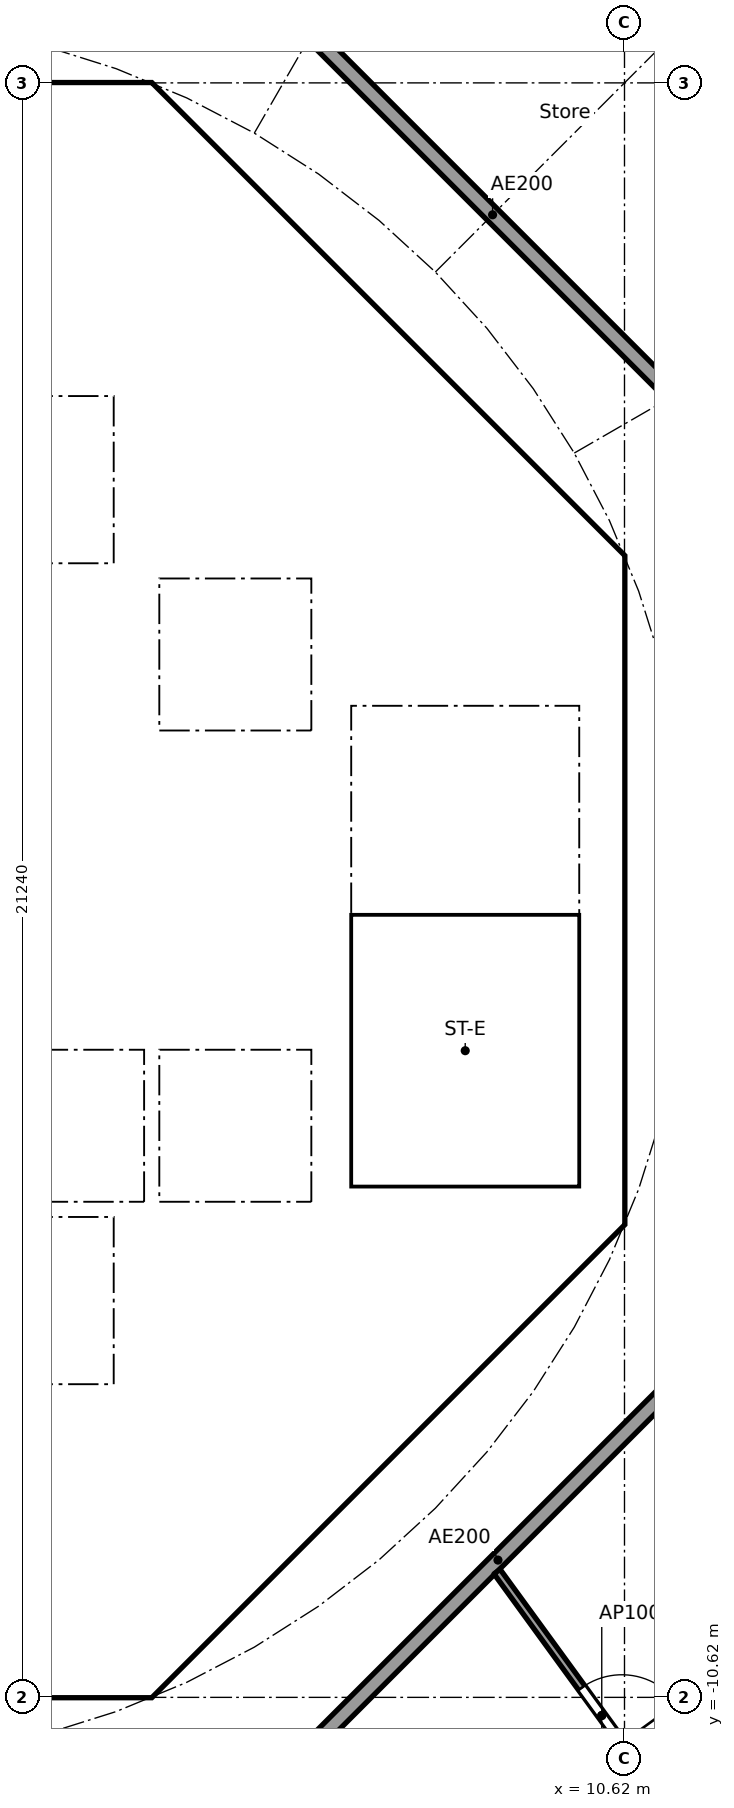
"""IFC4 building model, lengths in metres.
Left out: names, types, materials, properties, quantities, classifications, styles, units other than length and angle.
Written with IfcOpenShell. Run it as: python <this file> out.ifc"""

import sys

from ifc_helpers import new_model, si_unit, direction, frame, frame_2d, origin, place, context, subcontext, project, spatial, polyline, rectangle, outline, extrude, element, fill, save


model = new_model("IFC4")
c1 = context("Model", 3, precision=1e-05, world=origin(), true_north=direction((0.0, 1.0)))
c2 = subcontext(c1, "Body", "Model", "MODEL_VIEW")
j1 = project(units=[si_unit("LENGTHUNIT", "METRE"), si_unit("PLANEANGLEUNIT", "RADIAN")], contexts=[c1])
p1 = place(None, origin())
s1 = spatial("IfcSite", under=j1, at=p1, CompositionType="ELEMENT")
p2 = place(p1, origin())
s2 = spatial("IfcBuilding", under=s1, at=p2, CompositionType="ELEMENT")
p3 = place(p2, frame((0.0, 0.0, 269.6)))
s3 = spatial("IfcBuildingStorey", under=s2, at=p3, CompositionType="ELEMENT", Elevation=269.6)
p4 = place(p3, frame((9.988, 4.613, 0.0), z_axis=(0.0, 0.0, 1.0), x_axis=(-0.707106781187, 0.707106781187, 0.0)))
e1 = element("IfcWall", 1, at=p4, inside=s3, PredefinedType="SHEAR", context=c2, shape_type="SweptSolid", body=[
    extrude(rectangle(XDim=7.602, YDim=0.6, at=frame_2d((3.801, 0.0))), origin(), (0.0, 0.0, 1.0), 3.44),
])
p5 = place(p4, frame((3.201, 0.0, 0.0)))
e2 = element("IfcOpeningElement", 2, at=p5, cuts=e1, PredefinedType="OPENING", context=c2, shape_type="SweptSolid", body=[
    extrude(rectangle(XDim=1.2, YDim=2.1, at=frame_2d((0.6, 1.05))), frame((0.0, 0.31, 0.0), z_axis=(0.0, -1.0, 0.0), x_axis=(1.0, 0.0, 0.0)), (0.0, 0.0, 1.0), 0.62),
])
p6 = place(p3, frame((4.613, -9.988, 0.0), z_axis=(0.0, 0.0, 1.0), x_axis=(0.707106781187, 0.707106781187, 0.0)))
e3 = element("IfcWall", 3, at=p6, inside=s3, PredefinedType="SHEAR", context=c2, shape_type="SweptSolid", body=[
    extrude(rectangle(XDim=7.602, YDim=0.6, at=frame_2d((3.801, 0.0))), origin(), (0.0, 0.0, 1.0), 3.44),
])
p7 = place(p6, frame((3.201, 0.0, 0.0)))
e4 = element("IfcOpeningElement", 4, at=p7, cuts=e3, PredefinedType="OPENING", context=c2, shape_type="SweptSolid", body=[
    extrude(rectangle(XDim=1.2, YDim=2.1, at=frame_2d((0.6, 1.05))), frame((0.0, 0.31, 0.0), z_axis=(0.0, -1.0, 0.0), x_axis=(1.0, 0.0, 0.0)), (0.0, 0.0, 1.0), 0.62),
])
p8 = place(p3, frame((4.0, 4.3, 0.0), z_axis=(0.0, 0.0, 1.0), x_axis=(0.0, 1.0, 0.0)))
e5 = element("IfcWall", 5, at=p8, inside=s3, PredefinedType="SOLIDWALL", context=c2, shape_type="SweptSolid", body=[
    extrude(rectangle(XDim=2.2, YDim=0.2, at=frame_2d((1.1, 0.0))), origin(), (0.0, 0.0, 1.0), 3.44),
])
p9 = place(p8, frame((0.55, 0.0, 0.0)))
e6 = element("IfcOpeningElement", 6, at=p9, cuts=e5, PredefinedType="OPENING", context=c2, shape_type="SweptSolid", body=[
    extrude(rectangle(XDim=1.1, YDim=2.1, at=frame_2d((0.55, 1.05))), frame((0.0, 0.11, 0.0), z_axis=(0.0, -1.0, 0.0), x_axis=(1.0, 0.0, 0.0)), (0.0, 0.0, 1.0), 0.22),
])
p10 = place(p3, frame((-6.7, 2.0, 0.0), z_axis=(0.0, 0.0, 1.0), x_axis=(1.0, 0.0, 0.0)))
e7 = element("IfcWall", 7, at=p10, inside=s3, PredefinedType="SOLIDWALL", context=c2, shape_type="SweptSolid", body=[
    extrude(rectangle(XDim=13.4, YDim=0.2, at=frame_2d((6.7, 0.0))), origin(), (0.0, 0.0, 1.0), 3.44),
])
p11 = place(p10, frame((11.65, 0.0, 0.0)))
e8 = element("IfcOpeningElement", 8, at=p11, cuts=e7, PredefinedType="OPENING", context=c2, shape_type="SweptSolid", body=[
    extrude(rectangle(XDim=1.1, YDim=2.1, at=frame_2d((0.55, 1.05))), frame((0.0, 0.11, 0.0), z_axis=(0.0, -1.0, 0.0), x_axis=(1.0, 0.0, 0.0)), (0.0, 0.0, 1.0), 0.22),
])
p12 = place(p10, frame((0.75, 0.0, 0.0)))
e9 = element("IfcOpeningElement", 9, at=p12, cuts=e7, PredefinedType="OPENING", context=c2, shape_type="SweptSolid", body=[
    extrude(rectangle(XDim=0.9, YDim=2.1, at=frame_2d((0.45, 1.05))), frame((0.0, 0.11, 0.0), z_axis=(0.0, -1.0, 0.0), x_axis=(1.0, 0.0, 0.0)), (0.0, 0.0, 1.0), 0.22),
])
p13 = place(p10, frame((4.05, 0.0, 0.0)))
e10 = element("IfcOpeningElement", 10, at=p13, cuts=e7, PredefinedType="OPENING", context=c2, shape_type="SweptSolid", body=[
    extrude(rectangle(XDim=0.9, YDim=2.1, at=frame_2d((0.45, 1.05))), frame((0.0, 0.11, 0.0), z_axis=(0.0, -1.0, 0.0), x_axis=(1.0, 0.0, 0.0)), (0.0, 0.0, 1.0), 0.22),
])
p14 = place(p10, frame((7.35, 0.0, 0.0)))
e11 = element("IfcOpeningElement", 11, at=p14, cuts=e7, PredefinedType="OPENING", context=c2, shape_type="SweptSolid", body=[
    extrude(rectangle(XDim=0.9, YDim=2.1, at=frame_2d((0.45, 1.05))), frame((0.0, 0.11, 0.0), z_axis=(0.0, -1.0, 0.0), x_axis=(1.0, 0.0, 0.0)), (0.0, 0.0, 1.0), 0.22),
])
p15 = place(p10, frame((9.55, 0.0, 0.0)))
e12 = element("IfcOpeningElement", 12, at=p15, cuts=e7, PredefinedType="OPENING", context=c2, shape_type="SweptSolid", body=[
    extrude(rectangle(XDim=0.9, YDim=2.1, at=frame_2d((0.45, 1.05))), frame((0.0, 0.11, 0.0), z_axis=(0.0, -1.0, 0.0), x_axis=(1.0, 0.0, 0.0)), (0.0, 0.0, 1.0), 0.22),
])
p16 = place(p3, frame((6.7, 4.0, 0.0), z_axis=(0.0, 0.0, 1.0), x_axis=(1.0, 0.0, 0.0)))
e13 = element("IfcWall", 13, at=p16, inside=s3, PredefinedType="SOLIDWALL", context=c2, shape_type="SweptSolid", body=[
    extrude(rectangle(XDim=3.325, YDim=0.2, at=frame_2d((1.662, 0.0))), origin(), (0.0, 0.0, 1.0), 3.44),
])
p17 = place(p16, frame((1.25, 0.0, 0.0)))
e14 = element("IfcOpeningElement", 14, at=p17, cuts=e13, PredefinedType="OPENING", context=c2, shape_type="SweptSolid", body=[
    extrude(rectangle(XDim=1.1, YDim=2.1, at=frame_2d((0.55, 1.05))), frame((0.0, 0.11, 0.0), z_axis=(0.0, -1.0, 0.0), x_axis=(1.0, 0.0, 0.0)), (0.0, 0.0, 1.0), 0.22),
])
p18 = place(p3, frame((4.0, 7.025, 0.0), z_axis=(0.0, 0.0, 1.0), x_axis=(0.0, 1.0, 0.0)))
e15 = element("IfcWall", 15, at=p18, inside=s3, PredefinedType="SOLIDWALL", context=c2, shape_type="SweptSolid", body=[
    extrude(rectangle(XDim=3.0, YDim=0.2, at=frame_2d((1.5, 0.0))), origin(), (0.0, 0.0, 1.0), 3.44),
])
p19 = place(p18, frame((0.925, 0.0, 0.0)))
e16 = element("IfcOpeningElement", 16, at=p19, cuts=e15, PredefinedType="OPENING", context=c2, shape_type="SweptSolid", body=[
    extrude(rectangle(XDim=1.1, YDim=2.1, at=frame_2d((0.55, 1.05))), frame((0.0, 0.11, 0.0), z_axis=(0.0, -1.0, 0.0), x_axis=(1.0, 0.0, 0.0)), (0.0, 0.0, 1.0), 0.22),
])
p20 = place(p3, frame((4.0, -10.025, 0.0), z_axis=(0.0, 0.0, 1.0), x_axis=(0.0, 1.0, 0.0)))
e17 = element("IfcWall", 17, at=p20, inside=s3, PredefinedType="SOLIDWALL", context=c2, shape_type="SweptSolid", body=[
    extrude(rectangle(XDim=3.0, YDim=0.2, at=frame_2d((1.5, 0.0))), origin(), (0.0, 0.0, 1.0), 3.44),
])
p21 = place(p20, frame((0.975, 0.0, 0.0)))
e18 = element("IfcOpeningElement", 18, at=p21, cuts=e17, PredefinedType="OPENING", context=c2, shape_type="SweptSolid", body=[
    extrude(rectangle(XDim=1.1, YDim=2.1, at=frame_2d((0.55, 1.05))), frame((0.0, 0.11, 0.0), z_axis=(0.0, -1.0, 0.0), x_axis=(1.0, 0.0, 0.0)), (0.0, 0.0, 1.0), 0.22),
])
p22 = place(p3, frame((4.0, -6.5, 0.0), z_axis=(0.0, 0.0, 1.0), x_axis=(0.0, 1.0, 0.0)))
e19 = element("IfcWall", 19, at=p22, inside=s3, PredefinedType="SOLIDWALL", context=c2, shape_type="SweptSolid", body=[
    extrude(rectangle(XDim=2.2, YDim=0.2, at=frame_2d((1.1, 0.0))), origin(), (0.0, 0.0, 1.0), 3.44),
])
p23 = place(p22, frame((0.55, 0.0, 0.0)))
e20 = element("IfcOpeningElement", 20, at=p23, cuts=e19, PredefinedType="OPENING", context=c2, shape_type="SweptSolid", body=[
    extrude(rectangle(XDim=1.1, YDim=2.1, at=frame_2d((0.55, 1.05))), frame((0.0, 0.11, 0.0), z_axis=(0.0, -1.0, 0.0), x_axis=(1.0, 0.0, 0.0)), (0.0, 0.0, 1.0), 0.22),
])
p24 = place(p3, frame((-6.7, -2.0, 0.0), z_axis=(0.0, 0.0, 1.0), x_axis=(1.0, 0.0, 0.0)))
e21 = element("IfcWall", 21, at=p24, inside=s3, PredefinedType="SOLIDWALL", context=c2, shape_type="SweptSolid", body=[
    extrude(rectangle(XDim=13.4, YDim=0.2, at=frame_2d((6.7, 0.0))), origin(), (0.0, 0.0, 1.0), 3.44),
])
p25 = place(p24, frame((9.45, 0.0, 0.0)))
e22 = element("IfcOpeningElement", 22, at=p25, cuts=e21, PredefinedType="OPENING", context=c2, shape_type="SweptSolid", body=[
    extrude(rectangle(XDim=1.1, YDim=2.1, at=frame_2d((0.55, 1.05))), frame((0.0, 0.11, 0.0), z_axis=(0.0, -1.0, 0.0), x_axis=(1.0, 0.0, 0.0)), (0.0, 0.0, 1.0), 0.22),
])
p26 = place(p24, frame((11.65, 0.0, 0.0)))
e23 = element("IfcOpeningElement", 23, at=p26, cuts=e21, PredefinedType="OPENING", context=c2, shape_type="SweptSolid", body=[
    extrude(rectangle(XDim=1.1, YDim=2.1, at=frame_2d((0.55, 1.05))), frame((0.0, 0.11, 0.0), z_axis=(0.0, -1.0, 0.0), x_axis=(1.0, 0.0, 0.0)), (0.0, 0.0, 1.0), 0.22),
])
p27 = place(p24, frame((1.85, 0.0, 0.0)))
e24 = element("IfcOpeningElement", 24, at=p27, cuts=e21, PredefinedType="OPENING", context=c2, shape_type="SweptSolid", body=[
    extrude(rectangle(XDim=0.9, YDim=2.1, at=frame_2d((0.45, 1.05))), frame((0.0, 0.11, 0.0), z_axis=(0.0, -1.0, 0.0), x_axis=(1.0, 0.0, 0.0)), (0.0, 0.0, 1.0), 0.22),
])
p28 = place(p24, frame((6.25, 0.0, 0.0)))
e25 = element("IfcOpeningElement", 25, at=p28, cuts=e21, PredefinedType="OPENING", context=c2, shape_type="SweptSolid", body=[
    extrude(rectangle(XDim=0.9, YDim=2.1, at=frame_2d((0.45, 1.05))), frame((0.0, 0.11, 0.0), z_axis=(0.0, -1.0, 0.0), x_axis=(1.0, 0.0, 0.0)), (0.0, 0.0, 1.0), 0.22),
])
p29 = place(p3, origin())
e26 = element("IfcWall", 26, at=p29, inside=s3, PredefinedType="SHEAR", context=c2, shape_type="SweptSolid", body=[
    extrude(outline(polyline([(-4.152, -10.025), (4.152, -10.025), (4.401, -9.776), (4.825, -10.2), (4.401, -10.625), (-4.401, -10.625), (-4.825, -10.2), (-4.401, -9.776), (-4.152, -10.025)])), origin(), (0.0, 0.0, 1.0), 3.44),
])
p30 = place(p3, origin())
e27 = element("IfcWall", 27, at=p30, inside=s3, PredefinedType="SHEAR", context=c2, shape_type="SweptSolid", body=[
    extrude(outline(polyline([(-4.152, 10.025), (-4.401, 9.776), (-4.825, 10.2), (-4.401, 10.625), (4.401, 10.625), (4.825, 10.2), (4.401, 9.776), (4.152, 10.025), (-4.152, 10.025)])), origin(), (0.0, 0.0, 1.0), 3.44),
])
p31 = place(p3, origin())
e28 = element("IfcWall", 28, at=p31, inside=s3, PredefinedType="SHEAR", context=c2, shape_type="SweptSolid", body=[
    extrude(outline(polyline([(9.776, -4.401), (10.025, -4.152), (10.025, -3.801), (10.025, 4.152), (9.776, 4.401), (10.2, 4.825), (10.625, 4.401), (10.625, -4.401), (10.2, -4.825), (9.776, -4.401)])), origin(), (0.0, 0.0, 1.0), 3.44),
])
p32 = place(p3, origin())
e29 = element("IfcWall", 29, at=p32, inside=s3, PredefinedType="SOLIDWALL", context=c2, shape_type="SweptSolid", body=[
    extrude(outline(polyline([(-6.7, 4.3), (6.7, 4.3), (6.7, 2.1), (6.5, 2.1), (6.5, 4.1), (4.5, 4.1), (4.5, 2.1), (4.3, 2.1), (4.3, 4.1), (2.3, 4.1), (2.3, 2.1), (2.1, 2.1), (2.1, 4.1), (0.1, 4.1), (0.1, 2.1), (-0.1, 2.1), (-0.1, 4.1), (-4.3, 4.1), (-4.3, 2.1), (-4.5, 2.1), (-4.5, 4.1), (-6.5, 4.1), (-6.5, 2.1), (-6.7, 2.1), (-6.7, 4.3)])), origin(), (0.0, 0.0, 1.0), 3.44),
])
p33 = place(p3, origin())
e30 = element("IfcWall", 30, at=p33, inside=s3, PredefinedType="SOLIDWALL", context=c2, shape_type="SweptSolid", body=[
    extrude(outline(polyline([(-6.7, -2.1), (-6.5, -2.1), (-6.5, -4.1), (-2.3, -4.1), (-2.3, -2.1), (-2.1, -2.1), (-2.1, -4.1), (2.1, -4.1), (2.1, -2.1), (2.3, -2.1), (2.3, -4.1), (4.3, -4.1), (4.3, -2.1), (4.5, -2.1), (4.5, -4.1), (6.5, -4.1), (6.5, -2.1), (6.7, -2.1), (6.7, -4.3), (-6.7, -4.3), (-6.7, -2.1)])), origin(), (0.0, 0.0, 1.0), 3.44),
])
p34 = place(p3, origin())
e31 = element("IfcWall", 31, at=p34, inside=s3, PredefinedType="SOLIDWALL", context=c2, shape_type="SweptSolid", body=[
    extrude(outline(polyline([(4.1, -7.025), (-4.1, -7.025), (-4.1, -6.5), (4.1, -6.5), (4.1, -7.025)])), origin(), (0.0, 0.0, 1.0), 3.44),
])
p35 = place(p3, origin())
e32 = element("IfcWall", 32, at=p35, inside=s3, PredefinedType="SOLIDWALL", context=c2, shape_type="SweptSolid", body=[
    extrude(outline(polyline([(4.1, 6.5), (-4.1, 6.5), (-4.1, 7.025), (4.1, 7.025), (4.1, 6.5)])), origin(), (0.0, 0.0, 1.0), 3.44),
])
p36 = place(p3, origin())
e33 = element("IfcWall", 33, at=p36, inside=s3, PredefinedType="SOLIDWALL", context=c2, shape_type="SweptSolid", body=[
    extrude(outline(polyline([(7.025, -3.9), (6.7, -3.9), (6.7, 3.9), (7.025, 3.9), (7.025, -3.9)])), origin(), (0.0, 0.0, 1.0), 3.44),
])
p37 = place(p3, origin())
e34 = element("IfcWall", 34, at=p37, inside=s3, PredefinedType="SOLIDWALL", context=c2, shape_type="SweptSolid", body=[
    extrude(outline(polyline([(10.025, -4.1), (6.7, -4.1), (6.7, -3.9), (10.025, -3.9), (10.025, -4.1)])), origin(), (0.0, 0.0, 1.0), 3.44),
])
p38 = place(p3, frame((12.635, 5.134, 0.0), z_axis=(0.0, 0.0, 1.0), x_axis=(-0.707106781187, 0.707106781187, 0.0)))
e35 = element("IfcWall", 35, at=p38, inside=s3, PredefinedType="PARTITIONING", context=c2, shape_type="SweptSolid", body=[
    extrude(rectangle(XDim=10.609, YDim=0.2, at=frame_2d((5.305, 0.0))), origin(), (0.0, 0.0, 1.0), 3.44),
])
p39 = place(p3, frame((5.275, -12.494, 0.0), z_axis=(0.0, 0.0, 1.0), x_axis=(0.707106781187, 0.707106781187, 0.0)))
e36 = element("IfcWall", 36, at=p39, inside=s3, PredefinedType="PARTITIONING", context=c2, shape_type="SweptSolid", body=[
    extrude(rectangle(XDim=10.409, YDim=0.2, at=frame_2d((5.205, 0.0))), origin(), (0.0, 0.0, 1.0), 3.44),
])
p40 = place(p3, frame((15.002, 6.543, 0.0), z_axis=(0.0, 0.0, 1.0), x_axis=(-0.637932656528, 0.770092154054, 0.0)))
e37 = element("IfcWall", 37, at=p40, inside=s3, PredefinedType="PARTITIONING", context=c2, shape_type="SweptSolid", body=[
    extrude(rectangle(XDim=6.311, YDim=0.1, at=frame_2d((3.155, 0.0))), origin(), (0.0, 0.0, 1.0), 2.905),
])
p41 = place(p3, frame((10.304, -14.555, 0.0), z_axis=(0.0, 0.0, 1.0), x_axis=(0.628170338674, 0.778075848237, 0.0)))
e38 = element("IfcWall", 38, at=p41, inside=s3, PredefinedType="PARTITIONING", context=c2, shape_type="SweptSolid", body=[
    extrude(rectangle(XDim=4.532, YDim=0.1, at=frame_2d((2.266, 0.0))), origin(), (0.0, 0.0, 1.0), 2.905),
])
p42 = place(p41, frame((0.683, 0.0, 0.0)))
e39 = element("IfcOpeningElement", 39, at=p42, cuts=e38, PredefinedType="OPENING", context=c2, shape_type="SweptSolid", body=[
    extrude(rectangle(XDim=0.9, YDim=2.1, at=frame_2d((0.45, 1.05))), frame((0.0, 0.06, 0.0), z_axis=(0.0, -1.0, 0.0), x_axis=(1.0, 0.0, 0.0)), (0.0, 0.0, 1.0), 0.12),
])
p43 = place(p3, frame((8.943, -8.966, 0.0), z_axis=(0.0, 0.0, 1.0), x_axis=(0.588357698232, -0.808600778463, 0.0)))
e40 = element("IfcWall", 40, at=p43, inside=s3, PredefinedType="PARTITIONING", context=c2, shape_type="SweptSolid", body=[
    extrude(rectangle(XDim=4.682, YDim=0.1, at=frame_2d((2.341, 0.0))), origin(), (0.0, 0.0, 1.0), 2.762),
])
p44 = place(p43, frame((1.891, 0.0, 0.0)))
e41 = element("IfcOpeningElement", 41, at=p44, cuts=e40, PredefinedType="OPENING", context=c2, shape_type="SweptSolid", body=[
    extrude(rectangle(XDim=0.9, YDim=2.1, at=frame_2d((0.45, 1.05))), frame((0.0, 0.06, 0.0), z_axis=(0.0, -1.0, 0.0), x_axis=(1.0, 0.0, 0.0)), (0.0, 0.0, 1.0), 0.12),
])
p45 = place(p11, origin())
e42 = element("IfcDoor", 42, at=p45, inside=s3, OperationType="DOUBLE_DOOR_SLIDING", PredefinedType="DOOR", context=c2, shape_type="SweptSolid", body=[
    extrude(rectangle(XDim=1.1, YDim=2.1, at=frame_2d((0.55, 1.05))), frame((0.0, 0.025, 0.0), z_axis=(0.0, -1.0, 0.0), x_axis=(1.0, 0.0, 0.0)), (0.0, 0.0, 1.0), 0.05),
])
fill(e8, e42)
p46 = place(p25, origin())
e43 = element("IfcDoor", 43, at=p46, inside=s3, OperationType="DOUBLE_DOOR_SLIDING", PredefinedType="DOOR", context=c2, shape_type="SweptSolid", body=[
    extrude(rectangle(XDim=1.1, YDim=2.1, at=frame_2d((0.55, 1.05))), frame((0.0, 0.025, 0.0), z_axis=(0.0, -1.0, 0.0), x_axis=(1.0, 0.0, 0.0)), (0.0, 0.0, 1.0), 0.05),
])
fill(e22, e43)
p47 = place(p26, origin())
e44 = element("IfcDoor", 44, at=p47, inside=s3, OperationType="DOUBLE_DOOR_SLIDING", PredefinedType="DOOR", context=c2, shape_type="SweptSolid", body=[
    extrude(rectangle(XDim=1.1, YDim=2.1, at=frame_2d((0.55, 1.05))), frame((0.0, 0.025, 0.0), z_axis=(0.0, -1.0, 0.0), x_axis=(1.0, 0.0, 0.0)), (0.0, 0.0, 1.0), 0.05),
])
fill(e23, e44)
p48 = place(p9, origin())
e45 = element("IfcDoor", 45, at=p48, inside=s3, OperationType="DOUBLE_DOOR_SLIDING", PredefinedType="DOOR", context=c2, shape_type="SweptSolid", body=[
    extrude(rectangle(XDim=1.1, YDim=2.1, at=frame_2d((0.55, 1.05))), frame((0.0, 0.025, 0.0), z_axis=(0.0, -1.0, 0.0), x_axis=(1.0, 0.0, 0.0)), (0.0, 0.0, 1.0), 0.05),
])
fill(e6, e45)
p49 = place(p23, origin())
e46 = element("IfcDoor", 46, at=p49, inside=s3, OperationType="DOUBLE_DOOR_SLIDING", PredefinedType="DOOR", context=c2, shape_type="SweptSolid", body=[
    extrude(rectangle(XDim=1.1, YDim=2.1, at=frame_2d((0.55, 1.05))), frame((0.0, 0.025, 0.0), z_axis=(0.0, -1.0, 0.0), x_axis=(1.0, 0.0, 0.0)), (0.0, 0.0, 1.0), 0.05),
])
fill(e20, e46)
p50 = place(p17, frame((1.1, 0.0, 0.0), x_axis=(-1.0, 0.0, 0.0)))
e47 = element("IfcDoor", 47, at=p50, inside=s3, OperationType="SINGLE_SWING_LEFT", PredefinedType="DOOR", context=c2, shape_type="SweptSolid", body=[
    extrude(rectangle(XDim=1.1, YDim=2.1, at=frame_2d((0.55, 1.05))), frame((0.0, 0.025, 0.0), z_axis=(0.0, -1.0, 0.0), x_axis=(1.0, 0.0, 0.0)), (0.0, 0.0, 1.0), 0.05),
])
fill(e14, e47)
p51 = place(p19, origin())
e48 = element("IfcDoor", 48, at=p51, inside=s3, OperationType="SINGLE_SWING_RIGHT", PredefinedType="DOOR", context=c2, shape_type="SweptSolid", body=[
    extrude(rectangle(XDim=1.1, YDim=2.1, at=frame_2d((0.55, 1.05))), frame((0.0, 0.025, 0.0), z_axis=(0.0, -1.0, 0.0), x_axis=(1.0, 0.0, 0.0)), (0.0, 0.0, 1.0), 0.05),
])
fill(e16, e48)
p52 = place(p21, origin())
e49 = element("IfcDoor", 49, at=p52, inside=s3, OperationType="SINGLE_SWING_LEFT", PredefinedType="DOOR", context=c2, shape_type="SweptSolid", body=[
    extrude(rectangle(XDim=1.1, YDim=2.1, at=frame_2d((0.55, 1.05))), frame((0.0, 0.025, 0.0), z_axis=(0.0, -1.0, 0.0), x_axis=(1.0, 0.0, 0.0)), (0.0, 0.0, 1.0), 0.05),
])
fill(e18, e49)
p53 = place(p15, origin())
e50 = element("IfcDoor", 50, at=p53, inside=s3, OperationType="SINGLE_SWING_LEFT", PredefinedType="DOOR", context=c2, shape_type="SweptSolid", body=[
    extrude(rectangle(XDim=0.9, YDim=2.1, at=frame_2d((0.45, 1.05))), frame((0.0, 0.025, 0.0), z_axis=(0.0, -1.0, 0.0), x_axis=(1.0, 0.0, 0.0)), (0.0, 0.0, 1.0), 0.05),
])
fill(e12, e50)
p54 = place(p5, origin())
e51 = element("IfcDoor", 51, at=p54, inside=s3, OperationType="SINGLE_SWING_RIGHT", PredefinedType="DOOR", context=c2, shape_type="SweptSolid", body=[
    extrude(rectangle(XDim=1.2, YDim=2.1, at=frame_2d((0.6, 1.05))), frame((0.0, 0.025, 0.0), z_axis=(0.0, -1.0, 0.0), x_axis=(1.0, 0.0, 0.0)), (0.0, 0.0, 1.0), 0.05),
])
fill(e2, e51)
p55 = place(p7, origin())
e52 = element("IfcDoor", 52, at=p55, inside=s3, OperationType="SINGLE_SWING_RIGHT", PredefinedType="DOOR", context=c2, shape_type="SweptSolid", body=[
    extrude(rectangle(XDim=1.2, YDim=2.1, at=frame_2d((0.6, 1.05))), frame((0.0, 0.025, 0.0), z_axis=(0.0, -1.0, 0.0), x_axis=(1.0, 0.0, 0.0)), (0.0, 0.0, 1.0), 0.05),
])
fill(e4, e52)
p56 = place(p44, origin())
e53 = element("IfcDoor", 53, at=p56, inside=s3, OperationType="SINGLE_SWING_RIGHT", PredefinedType="DOOR", context=c2, shape_type="SweptSolid", body=[
    extrude(rectangle(XDim=0.9, YDim=2.1, at=frame_2d((0.45, 1.05))), frame((0.0, 0.025, 0.0), z_axis=(0.0, -1.0, 0.0), x_axis=(1.0, 0.0, 0.0)), (0.0, 0.0, 1.0), 0.05),
])
fill(e41, e53)
save(model, sys.argv[1])
